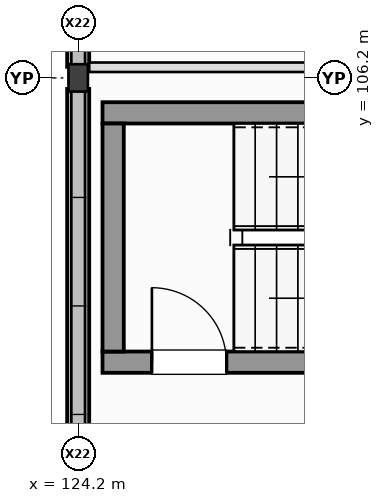
"""IFC4 building model, lengths in metres.
Left out: names, types, materials, properties, quantities, classifications, styles, units other than length and angle.
Written with IfcOpenShell. Run it as: python <this file> out.ifc"""

import sys

from ifc_helpers import new_model, si_unit, direction, frame, frame_2d, origin, origin_2d, place, context, subcontext, project, spatial, rectangle, i_section, extrude, element, fill, save


model = new_model("IFC4")
c1 = context("Model", 3, precision=1e-05, world=origin(), true_north=direction((0.0, 1.0)))
c2 = subcontext(c1, "Body", "Model", "MODEL_VIEW")
j1 = project(units=[si_unit("LENGTHUNIT", "METRE"), si_unit("PLANEANGLEUNIT", "RADIAN")], contexts=[c1])
p1 = place(None, origin())
s1 = spatial("IfcSite", under=j1, at=p1, CompositionType="ELEMENT")
p2 = place(p1, origin())
s2 = spatial("IfcBuilding", under=s1, at=p2, CompositionType="ELEMENT")
p3 = place(p2, frame((0.0, 0.0, 14.0)))
s3 = spatial("IfcBuildingStorey", under=s2, at=p3, CompositionType="ELEMENT", Elevation=14.0)
p4 = place(p3, frame((124.2, 106.2, 0.0), z_axis=(0.0, 0.0, 1.0), x_axis=(1.0, 0.0, 0.0)))
e1 = element("IfcColumn", 1, at=p4, inside=s3, PredefinedType="COLUMN", context=c2, shape_type="SweptSolid", body=[
    extrude(i_section(OverallWidth=0.256, OverallDepth=0.36, WebThickness=0.011, FlangeThickness=0.02, at=origin_2d()), origin(), (0.0, 0.0, 1.0), 4.0),
])
p5 = place(p3, frame((124.2, 106.055, 0.0), z_axis=(0.0, 0.0, 1.0), x_axis=(0.0, -1.0, 0.0)))
e2 = element("IfcWall", 2, at=p5, inside=s3, PredefinedType="STANDARD", context=c2, shape_type="SweptSolid", body=[
    extrude(rectangle(XDim=5.71, YDim=0.29, at=frame_2d((2.855, 0.0))), origin(), (0.0, 0.0, 1.0), 0.92),
])
p6 = place(p3, frame((124.2, 112.055, 0.0), z_axis=(0.0, 0.0, 1.0), x_axis=(0.0, -1.0, 0.0)))
e3 = element("IfcWall", 3, at=p6, inside=s3, PredefinedType="STANDARD", context=c2, shape_type="SweptSolid", body=[
    extrude(rectangle(XDim=5.71, YDim=0.29, at=frame_2d((2.855, 0.0))), origin(), (0.0, 0.0, 1.0), 0.32),
])
p7 = place(p3, frame((124.52, 102.46, 0.0), z_axis=(0.0, 0.0, 1.0), x_axis=(1.0, 0.0, 0.0)))
e4 = element("IfcWall", 4, at=p7, inside=s3, PredefinedType="SHEAR", context=c2, shape_type="SweptSolid", body=[
    extrude(rectangle(XDim=8.16, YDim=0.28, at=frame_2d((4.08, 0.0))), origin(), (0.0, 0.0, 1.0), 4.0),
])
p8 = place(p7, frame((0.65, 0.0, 0.0)))
e5 = element("IfcOpeningElement", 5, at=p8, cuts=e4, PredefinedType="OPENING", context=c2, shape_type="SweptSolid", body=[
    extrude(rectangle(XDim=0.98, YDim=2.15, at=frame_2d((0.49, 1.075))), frame((0.0, 0.15, 0.0), z_axis=(0.0, -1.0, 0.0), x_axis=(1.0, 0.0, 0.0)), (0.0, 0.0, 1.0), 0.3),
])
p9 = place(p3, frame((132.68, 105.74, 0.0), z_axis=(0.0, 0.0, 1.0), x_axis=(-1.0, 0.0, 0.0)))
e6 = element("IfcWall", 6, at=p9, inside=s3, PredefinedType="SHEAR", context=c2, shape_type="SweptSolid", body=[
    extrude(rectangle(XDim=8.16, YDim=0.28, at=frame_2d((4.08, 0.0))), origin(), (0.0, 0.0, 1.0), 4.0),
])
p10 = place(p3, frame((124.66, 105.6, 0.0), z_axis=(0.0, 0.0, 1.0), x_axis=(0.0, -1.0, 0.0)))
e7 = element("IfcWall", 7, at=p10, inside=s3, PredefinedType="SHEAR", context=c2, shape_type="SweptSolid", body=[
    extrude(rectangle(XDim=3.0, YDim=0.28, at=frame_2d((1.5, 0.0))), origin(), (0.0, 0.0, 1.0), 4.0),
])
p11 = place(p3, frame((133.738, 106.34, 0.0), z_axis=(0.0, 0.0, 1.0), x_axis=(-1.0, 0.0, 0.0)))
e8 = element("IfcWall", 8, at=p11, inside=s3, PredefinedType="PARTITIONING", context=c2, shape_type="SweptSolid", body=[
    extrude(rectangle(XDim=9.393, YDim=0.125, at=frame_2d((4.696, 0.0))), origin(), (0.0, 0.0, 1.0), 3.269),
])
p12 = place(p8, origin())
e9 = element("IfcDoor", 9, at=p12, inside=s3, OperationType="SINGLE_SWING_LEFT", PredefinedType="DOOR", context=c2, shape_type="SweptSolid", body=[
    extrude(rectangle(XDim=0.98, YDim=2.15, at=frame_2d((0.49, 1.075))), frame((0.0, 0.025, 0.0), z_axis=(0.0, -1.0, 0.0), x_axis=(1.0, 0.0, 0.0)), (0.0, 0.0, 1.0), 0.05),
])
fill(e5, e9)
save(model, sys.argv[1])
